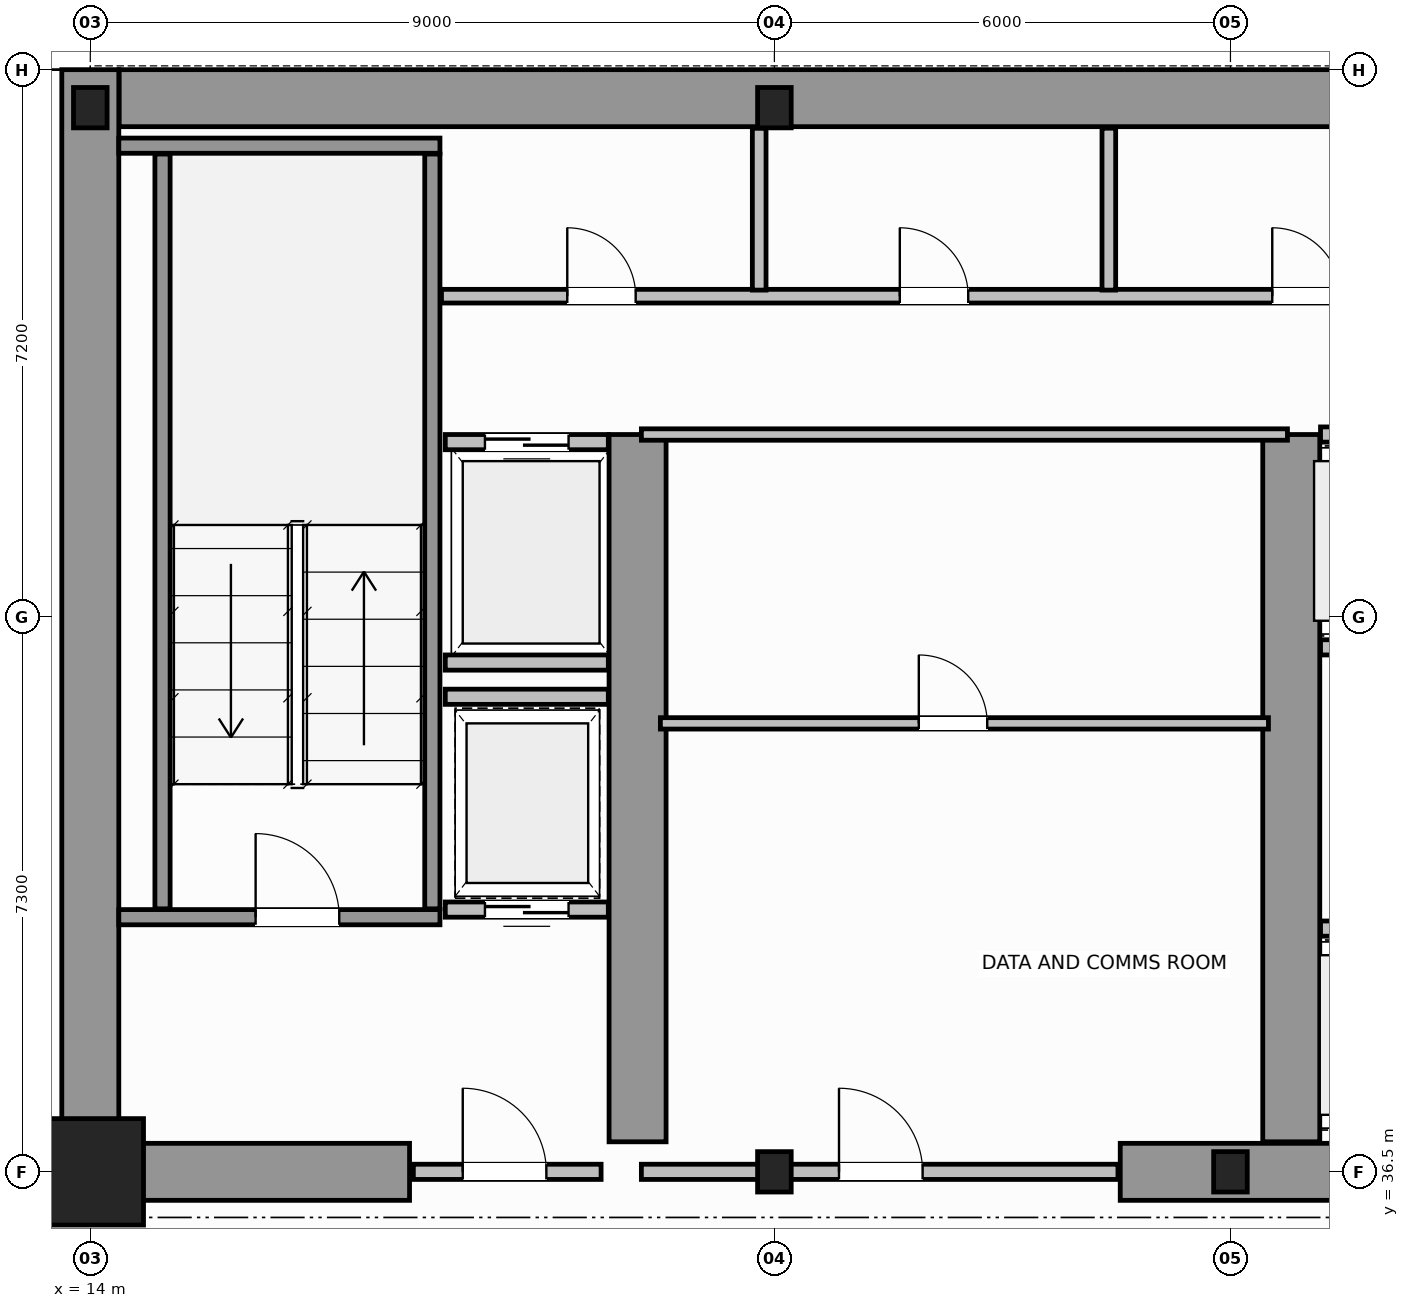
"""IFC4 building model, lengths in metres.
Left out: names, types, materials, properties, quantities, classifications, styles, units other than length and angle.
Written with IfcOpenShell. Run it as: python <this file> out.ifc"""

import sys

from ifc_helpers import new_model, si_unit, direction, frame, frame_2d, origin, origin_2d, place, context, subcontext, project, spatial, rectangle, i_section, extrude, source, transform, mapped, element, fill, save


model = new_model("IFC4")
c1 = context("Model", 3, precision=1e-05, world=origin(), true_north=direction((0.0, 1.0)))
c2 = subcontext(c1, "Body", "Model", "MODEL_VIEW")
j1 = project(units=[si_unit("LENGTHUNIT", "METRE"), si_unit("PLANEANGLEUNIT", "RADIAN")], contexts=[c1])
p1 = place(None, origin())
s1 = spatial("IfcSite", under=j1, at=p1, CompositionType="ELEMENT")
p2 = place(p1, origin())
s2 = spatial("IfcBuilding", under=s1, at=p2, CompositionType="ELEMENT")
p3 = place(p2, frame((0.0, 0.0, 111.0)))
s3 = spatial("IfcBuildingStorey", under=s2, at=p3, CompositionType="ELEMENT", Elevation=111.0)
m1 = source(origin(), c2, "Body", "SweptSolid", [
    extrude(rectangle(XDim=1.4, YDim=1.4, at=origin_2d()), origin(), (0.0, 0.0, 1.0), 3.8),
])
p4 = place(p3, frame((14.0, 36.5, 0.0), z_axis=(0.0, 0.0, 1.0), x_axis=(1.0, 0.0, 0.0)))
e1 = element("IfcColumn", 1, at=p4, inside=s3, PredefinedType="COLUMN", context=c2, shape_type="MappedRepresentation", body=[
    mapped(m1, transform((0.0, 0.0, 0.0), scale=1.0)),
])
m2 = source(origin(), c2, "Body", "SweptSolid", [
    extrude(i_section(OverallWidth=0.442, OverallDepth=0.531, WebThickness=0.065, FlangeThickness=0.076, FilletRadius=0.015, at=origin_2d()), origin(), (0.0, 0.0, 1.0), 3.8),
])
for number, where, z_axis, x_axis in (
    (2, (23.0, 36.5, 0.0), (0.0, 0.0, 1.0), (1.0, 0.0, 0.0)),
    (3, (29.0, 36.5, 0.0), (0.0, 0.0, 1.0), (1.0, 0.0, 0.0)),
    (4, (14.0, 50.5, 0.0), (0.0, 0.0, 1.0), (1.0, 0.0, 0.0)),
    (5, (23.0, 50.5, 0.0), (0.0, 0.0, 1.0), (1.0, 0.0, 0.0)),
):
    element("IfcColumn", number, at=place(p3, frame(where, z_axis=z_axis, x_axis=x_axis)), inside=s3, PredefinedType="COLUMN", context=c2, shape_type="MappedRepresentation", body=[
        mapped(m2, transform((0.0, 0.0, 0.0), scale=1.0)),
    ])
p5 = place(p3, frame((14.379, 50.625, 0.0), z_axis=(0.0, 0.0, 1.0), x_axis=(1.0, 0.0, 0.0)))
e6 = element("IfcWall", 6, at=p5, inside=s3, PredefinedType="SHEAR", context=c2, shape_type="SweptSolid", body=[
    extrude(rectangle(XDim=19.619, YDim=0.75, at=frame_2d((9.81, 0.0))), origin(), (0.0, 0.0, 1.0), 3.8),
])
p6 = place(p3, frame((14.0, 36.5, 0.0), z_axis=(0.0, 0.0, 1.0), x_axis=(0.0, 1.0, 0.0)))
e7 = element("IfcWall", 7, at=p6, inside=s3, PredefinedType="SHEAR", context=c2, shape_type="SweptSolid", body=[
    extrude(rectangle(XDim=14.5, YDim=0.75, at=frame_2d((7.25, 0.0))), origin(), (0.0, 0.0, 1.0), 3.8),
])
p7 = place(p3, frame((14.395, 36.5, 0.0), z_axis=(0.0, 0.0, 1.0), x_axis=(1.0, 0.0, 0.0)))
e8 = element("IfcWall", 8, at=p7, inside=s3, PredefinedType="SHEAR", context=c2, shape_type="SweptSolid", body=[
    extrude(rectangle(XDim=3.805, YDim=0.75, at=frame_2d((1.902, 0.0))), origin(), (0.0, 0.0, 1.0), 2.38),
])
p8 = place(p3, frame((27.55, 36.5, 0.0), z_axis=(0.0, 0.0, 1.0), x_axis=(1.0, 0.0, 0.0)))
e9 = element("IfcWall", 9, at=p8, inside=s3, PredefinedType="SHEAR", context=c2, shape_type="SweptSolid", body=[
    extrude(rectangle(XDim=4.5, YDim=0.75, at=frame_2d((2.25, 0.0))), origin(), (0.0, 0.0, 1.0), 3.8),
])
for number, where, z_axis, x_axis in (
    (10, (21.2, 36.895, 0.0), (0.0, 0.0, 1.0), (0.0, 1.0, 0.0)),
    (11, (29.8, 36.895, 0.0), (0.0, 0.0, 1.0), (0.0, 1.0, 0.0)),
):
    element("IfcWall", number, at=place(p3, frame(where, z_axis=z_axis, x_axis=x_axis)), inside=s3, PredefinedType="SHEAR", context=c2, shape_type="SweptSolid", body=[
        extrude(rectangle(XDim=9.305, YDim=0.75, at=frame_2d((4.652, 0.0))), origin(), (0.0, 0.0, 1.0), 3.8),
    ])
p9 = place(p3, frame((14.375, 39.85, 0.0), z_axis=(0.0, 0.0, 1.0), x_axis=(1.0, 0.0, 0.0)))
e12 = element("IfcWall", 12, at=p9, inside=s3, PredefinedType="SOLIDWALL", context=c2, shape_type="SweptSolid", body=[
    extrude(rectangle(XDim=4.225, YDim=0.2, at=frame_2d((2.113, 0.0))), origin(), (0.0, 0.0, 1.0), 3.8),
])
p10 = place(p9, frame((1.8, 0.0, 0.0)))
e13 = element("IfcOpeningElement", 13, at=p10, cuts=e12, PredefinedType="OPENING", context=c2, shape_type="SweptSolid", body=[
    extrude(rectangle(XDim=1.1, YDim=2.15, at=frame_2d((0.55, 1.075))), frame((0.0, 0.11, 0.0), z_axis=(0.0, -1.0, 0.0), x_axis=(1.0, 0.0, 0.0)), (0.0, 0.0, 1.0), 0.22),
])
p11 = place(p3, frame((14.375, 50.0, 0.0), z_axis=(0.0, 0.0, 1.0), x_axis=(1.0, 0.0, 0.0)))
e14 = element("IfcWall", 14, at=p11, inside=s3, PredefinedType="SOLIDWALL", context=c2, shape_type="SweptSolid", body=[
    extrude(rectangle(XDim=4.225, YDim=0.2, at=frame_2d((2.113, 0.0))), origin(), (0.0, 0.0, 1.0), 3.8),
])
for number, where, z_axis, x_axis in (
    (15, (14.95, 39.96, 0.0), (0.0, 0.0, 1.0), (0.0, 1.0, 0.0)),
    (16, (18.5, 39.96, 0.0), (0.0, 0.0, 1.0), (0.0, 1.0, 0.0)),
):
    element("IfcWall", number, at=place(p3, frame(where, z_axis=z_axis, x_axis=x_axis)), inside=s3, PredefinedType="SOLIDWALL", context=c2, shape_type="SweptSolid", body=[
        extrude(rectangle(XDim=9.93, YDim=0.2, at=frame_2d((4.965, 0.0))), origin(), (0.0, 0.0, 1.0), 3.8),
    ])
p12 = place(p3, frame((18.25, 36.5, 0.0), z_axis=(0.0, 0.0, 1.0), x_axis=(1.0, 0.0, 0.0)))
e17 = element("IfcWall", 17, at=p12, inside=s3, PredefinedType="SOLIDWALL", context=c2, shape_type="SweptSolid", body=[
    extrude(rectangle(XDim=2.47, YDim=0.2, at=frame_2d((1.235, 0.0))), origin(), (0.0, 0.0, 1.0), 2.37),
])
p13 = place(p12, frame((0.65, 0.0, 0.0)))
e18 = element("IfcOpeningElement", 18, at=p13, cuts=e17, PredefinedType="OPENING", context=c2, shape_type="SweptSolid", body=[
    extrude(rectangle(XDim=1.1, YDim=2.15, at=frame_2d((0.55, 1.075))), frame((0.0, 0.11, 0.0), z_axis=(0.0, -1.0, 0.0), x_axis=(1.0, 0.0, 0.0)), (0.0, 0.0, 1.0), 0.22),
])
p14 = place(p3, frame((30.185, 39.7, 0.0), z_axis=(0.0, 0.0, 1.0), x_axis=(1.0, 0.0, 0.0)))
e19 = element("IfcWall", 19, at=p14, inside=s3, PredefinedType="SOLIDWALL", context=c2, shape_type="SweptSolid", body=[
    extrude(rectangle(XDim=1.845, YDim=0.2, at=frame_2d((0.922, 0.0))), origin(), (0.0, 0.0, 1.0), 3.58),
])
p15 = place(p14, frame((0.373, 0.0, 0.0)))
e20 = element("IfcOpeningElement", 20, at=p15, cuts=e19, PredefinedType="OPENING", context=c2, shape_type="SweptSolid", body=[
    extrude(rectangle(XDim=1.1, YDim=2.15, at=frame_2d((0.55, 1.075))), frame((0.0, 0.11, 0.0), z_axis=(0.0, -1.0, 0.0), x_axis=(1.0, 0.0, 0.0)), (0.0, 0.0, 1.0), 0.22),
])
p16 = place(p3, frame((30.185, 43.4, 0.0), z_axis=(0.0, 0.0, 1.0), x_axis=(1.0, 0.0, 0.0)))
e21 = element("IfcWall", 21, at=p16, inside=s3, PredefinedType="SOLIDWALL", context=c2, shape_type="SweptSolid", body=[
    extrude(rectangle(XDim=1.725, YDim=0.2, at=frame_2d((0.862, 0.0))), origin(), (0.0, 0.0, 1.0), 3.58),
])
p17 = place(p16, frame((0.313, 0.0, 0.0)))
e22 = element("IfcOpeningElement", 22, at=p17, cuts=e21, PredefinedType="OPENING", context=c2, shape_type="SweptSolid", body=[
    extrude(rectangle(XDim=1.1, YDim=2.15, at=frame_2d((0.55, 1.075))), frame((0.0, 0.11, 0.0), z_axis=(0.0, -1.0, 0.0), x_axis=(1.0, 0.0, 0.0)), (0.0, 0.0, 1.0), 0.22),
])
p18 = place(p3, frame((30.185, 46.2, 0.0), z_axis=(0.0, 0.0, 1.0), x_axis=(1.0, 0.0, 0.0)))
e23 = element("IfcWall", 23, at=p18, inside=s3, PredefinedType="SOLIDWALL", context=c2, shape_type="SweptSolid", body=[
    extrude(rectangle(XDim=1.725, YDim=0.2, at=frame_2d((0.862, 0.0))), origin(), (0.0, 0.0, 1.0), 3.58),
])
p19 = place(p3, frame((18.67, 46.1, 0.0), z_axis=(0.0, 0.0, 1.0), x_axis=(1.0, 0.0, 0.0)))
e24 = element("IfcWall", 24, at=p19, inside=s3, PredefinedType="SOLIDWALL", context=c2, shape_type="SweptSolid", body=[
    extrude(rectangle(XDim=2.145, YDim=0.2, at=frame_2d((1.073, 0.0))), origin(), (0.0, 0.0, 1.0), 3.58),
])
p20 = place(p19, frame((0.522, 0.0, 0.0)))
e25 = element("IfcOpeningElement", 25, at=p20, cuts=e24, PredefinedType="OPENING", context=c2, shape_type="SweptSolid", body=[
    extrude(rectangle(XDim=1.1, YDim=2.15, at=frame_2d((0.55, 1.075))), frame((0.0, 0.11, 0.0), z_axis=(0.0, -1.0, 0.0), x_axis=(1.0, 0.0, 0.0)), (0.0, 0.0, 1.0), 0.22),
])
p21 = place(p3, frame((18.67, 43.2, 0.0), z_axis=(0.0, 0.0, 1.0), x_axis=(1.0, 0.0, 0.0)))
e26 = element("IfcWall", 26, at=p21, inside=s3, PredefinedType="SOLIDWALL", context=c2, shape_type="SweptSolid", body=[
    extrude(rectangle(XDim=2.145, YDim=0.2, at=frame_2d((1.073, 0.0))), origin(), (0.0, 0.0, 1.0), 3.58),
])
p22 = place(p3, frame((18.67, 39.95, 0.0), z_axis=(0.0, 0.0, 1.0), x_axis=(1.0, 0.0, 0.0)))
e27 = element("IfcWall", 27, at=p22, inside=s3, PredefinedType="SOLIDWALL", context=c2, shape_type="SweptSolid", body=[
    extrude(rectangle(XDim=2.145, YDim=0.2, at=frame_2d((1.073, 0.0))), origin(), (0.0, 0.0, 1.0), 3.58),
])
p23 = place(p22, frame((0.522, 0.0, 0.0)))
e28 = element("IfcOpeningElement", 28, at=p23, cuts=e27, PredefinedType="OPENING", context=c2, shape_type="SweptSolid", body=[
    extrude(rectangle(XDim=1.1, YDim=2.15, at=frame_2d((0.55, 1.075))), frame((0.0, 0.11, 0.0), z_axis=(0.0, -1.0, 0.0), x_axis=(1.0, 0.0, 0.0)), (0.0, 0.0, 1.0), 0.22),
])
p24 = place(p3, frame((18.67, 42.75, 0.0), z_axis=(0.0, 0.0, 1.0), x_axis=(1.0, 0.0, 0.0)))
e29 = element("IfcWall", 29, at=p24, inside=s3, PredefinedType="SOLIDWALL", context=c2, shape_type="SweptSolid", body=[
    extrude(rectangle(XDim=2.145, YDim=0.2, at=frame_2d((1.073, 0.0))), origin(), (0.0, 0.0, 1.0), 3.58),
])
p25 = place(p3, frame((21.25, 36.5, 0.0), z_axis=(0.0, 0.0, 1.0), x_axis=(1.0, 0.0, 0.0)))
e30 = element("IfcWall", 30, at=p25, inside=s3, PredefinedType="SOLIDWALL", context=c2, shape_type="SweptSolid", body=[
    extrude(rectangle(XDim=6.27, YDim=0.2, at=frame_2d((3.135, 0.0))), origin(), (0.0, 0.0, 1.0), 2.37),
])
p26 = place(p25, frame((2.6, 0.0, 0.0)))
e31 = element("IfcOpeningElement", 31, at=p26, cuts=e30, PredefinedType="OPENING", context=c2, shape_type="SweptSolid", body=[
    extrude(rectangle(XDim=1.1, YDim=2.15, at=frame_2d((0.55, 1.075))), frame((0.0, 0.11, 0.0), z_axis=(0.0, -1.0, 0.0), x_axis=(1.0, 0.0, 0.0)), (0.0, 0.0, 1.0), 0.22),
])
p27 = place(p3, frame((21.25, 46.2, 0.0), z_axis=(0.0, 0.0, 1.0), x_axis=(1.0, 0.0, 0.0)))
e32 = element("IfcWall", 32, at=p27, inside=s3, PredefinedType="PARTITIONING", context=c2, shape_type="SweptSolid", body=[
    extrude(rectangle(XDim=8.5, YDim=0.15, at=frame_2d((4.25, 0.0))), origin(), (0.0, 0.0, 1.0), 3.58),
])
p28 = place(p3, frame((21.5, 42.4, 0.0), z_axis=(0.0, 0.0, 1.0), x_axis=(1.0, 0.0, 0.0)))
e33 = element("IfcWall", 33, at=p28, inside=s3, PredefinedType="PARTITIONING", context=c2, shape_type="SweptSolid", body=[
    extrude(rectangle(XDim=8.0, YDim=0.15, at=frame_2d((4.0, 0.0))), origin(), (0.0, 0.0, 1.0), 3.58),
])
p29 = place(p28, frame((3.4, 0.0, 0.0)))
e34 = element("IfcOpeningElement", 34, at=p29, cuts=e33, PredefinedType="OPENING", context=c2, shape_type="SweptSolid", body=[
    extrude(rectangle(XDim=0.9, YDim=2.1, at=frame_2d((0.45, 1.05))), frame((0.0, 0.085, 0.0), z_axis=(0.0, -1.0, 0.0), x_axis=(1.0, 0.0, 0.0)), (0.0, 0.0, 1.0), 0.17),
])
p30 = place(p3, frame((18.62, 48.02, 0.0), z_axis=(0.0, 0.0, 1.0), x_axis=(1.0, 0.0, 0.0)))
e35 = element("IfcWall", 35, at=p30, inside=s3, PredefinedType="PLUMBINGWALL", context=c2, shape_type="SweptSolid", body=[
    extrude(rectangle(XDim=30.76, YDim=0.18, at=frame_2d((15.38, 0.0))), origin(), (0.0, 0.0, 1.0), 3.58),
])
p31 = place(p30, frame((1.655, 0.0, 0.0)))
e36 = element("IfcOpeningElement", 36, at=p31, cuts=e35, PredefinedType="OPENING", context=c2, shape_type="SweptSolid", body=[
    extrude(rectangle(XDim=0.9, YDim=2.15, at=frame_2d((0.45, 1.075))), frame((0.0, 0.1, 0.0), z_axis=(0.0, -1.0, 0.0), x_axis=(1.0, 0.0, 0.0)), (0.0, 0.0, 1.0), 0.2),
])
p32 = place(p30, frame((6.03, 0.0, 0.0)))
e37 = element("IfcOpeningElement", 37, at=p32, cuts=e35, PredefinedType="OPENING", context=c2, shape_type="SweptSolid", body=[
    extrude(rectangle(XDim=0.9, YDim=2.15, at=frame_2d((0.45, 1.075))), frame((0.0, 0.1, 0.0), z_axis=(0.0, -1.0, 0.0), x_axis=(1.0, 0.0, 0.0)), (0.0, 0.0, 1.0), 0.2),
])
p33 = place(p30, frame((10.93, 0.0, 0.0)))
e38 = element("IfcOpeningElement", 38, at=p33, cuts=e35, PredefinedType="OPENING", context=c2, shape_type="SweptSolid", body=[
    extrude(rectangle(XDim=0.9, YDim=2.15, at=frame_2d((0.45, 1.075))), frame((0.0, 0.1, 0.0), z_axis=(0.0, -1.0, 0.0), x_axis=(1.0, 0.0, 0.0)), (0.0, 0.0, 1.0), 0.2),
])
p34 = place(p30, frame((16.13, 0.0, 0.0)))
e39 = element("IfcOpeningElement", 39, at=p34, cuts=e35, PredefinedType="OPENING", context=c2, shape_type="SweptSolid", body=[
    extrude(rectangle(XDim=0.9, YDim=2.15, at=frame_2d((0.45, 1.075))), frame((0.0, 0.1, 0.0), z_axis=(0.0, -1.0, 0.0), x_axis=(1.0, 0.0, 0.0)), (0.0, 0.0, 1.0), 0.2),
])
p35 = place(p30, frame((21.73, 0.0, 0.0)))
e40 = element("IfcOpeningElement", 40, at=p35, cuts=e35, PredefinedType="OPENING", context=c2, shape_type="SweptSolid", body=[
    extrude(rectangle(XDim=0.9, YDim=2.15, at=frame_2d((0.45, 1.075))), frame((0.0, 0.1, 0.0), z_axis=(0.0, -1.0, 0.0), x_axis=(1.0, 0.0, 0.0)), (0.0, 0.0, 1.0), 0.2),
])
p36 = place(p30, frame((27.505, 0.0, 0.0)))
e41 = element("IfcOpeningElement", 41, at=p36, cuts=e35, PredefinedType="OPENING", context=c2, shape_type="SweptSolid", body=[
    extrude(rectangle(XDim=0.9, YDim=2.15, at=frame_2d((0.45, 1.075))), frame((0.0, 0.1, 0.0), z_axis=(0.0, -1.0, 0.0), x_axis=(1.0, 0.0, 0.0)), (0.0, 0.0, 1.0), 0.2),
])
p37 = place(p3, frame((22.8, 48.1, 0.0), z_axis=(0.0, 0.0, 1.0), x_axis=(0.0, 1.0, 0.0)))
e42 = element("IfcWall", 42, at=p37, inside=s3, PredefinedType="PLUMBINGWALL", context=c2, shape_type="SweptSolid", body=[
    extrude(rectangle(XDim=2.13, YDim=0.18, at=frame_2d((1.065, 0.0))), origin(), (0.0, 0.0, 1.0), 2.87),
])
p38 = place(p3, frame((27.4, 48.1, 0.0), z_axis=(0.0, 0.0, 1.0), x_axis=(0.0, 1.0, 0.0)))
e43 = element("IfcWall", 43, at=p38, inside=s3, PredefinedType="PLUMBINGWALL", context=c2, shape_type="SweptSolid", body=[
    extrude(rectangle(XDim=2.13, YDim=0.18, at=frame_2d((1.065, 0.0))), origin(), (0.0, 0.0, 1.0), 3.58),
])
p39 = place(p3, frame((7.271, 36.48, 0.0), z_axis=(0.0, 0.0, 1.0), x_axis=(1.0, 0.0, 0.0)))
e44 = element("IfcWall", 44, at=p39, inside=s3, PredefinedType="PARTITIONING", context=c2, shape_type="SweptSolid", body=[
    extrude(rectangle(XDim=6.668, YDim=0.12, at=frame_2d((3.334, 0.0))), origin(), (0.0, 0.0, 1.0), 2.87),
])
p40 = place(p39, frame((2.884, 0.0, 0.0)))
e45 = element("IfcOpeningElement", 45, at=p40, cuts=e44, PredefinedType="OPENING", context=c2, shape_type="SweptSolid", body=[
    extrude(rectangle(XDim=0.9, YDim=2.15, at=frame_2d((0.45, 1.075))), frame((0.0, 0.07, 0.0), z_axis=(0.0, -1.0, 0.0), x_axis=(1.0, 0.0, 0.0)), (0.0, 0.0, 1.0), 0.14),
])
m3 = source(origin(), c2, "Body", "SweptSolid", [
    extrude(rectangle(XDim=1.1, YDim=2.15, at=frame_2d((0.55, 1.075))), frame((0.0, 0.025, 0.0), z_axis=(0.0, -1.0, 0.0), x_axis=(1.0, 0.0, 0.0)), (0.0, 0.0, 1.0), 0.05),
])
p41 = place(p10, origin())
e46 = element("IfcDoor", 46, at=p41, inside=s3, OperationType="SINGLE_SWING_LEFT", PredefinedType="DOOR", context=c2, shape_type="MappedRepresentation", body=[
    mapped(m3, transform((0.0, 0.0, 0.0), scale=1.0)),
])
fill(e13, e46)
p42 = place(p13, origin())
e47 = element("IfcDoor", 47, at=p42, inside=s3, OperationType="SINGLE_SWING_RIGHT", PredefinedType="DOOR", context=c2, shape_type="MappedRepresentation", body=[
    mapped(m3, transform((0.0, 0.0, 0.0), scale=1.0)),
])
fill(e18, e47)
p43 = place(p20, origin())
e48 = element("IfcDoor", 48, at=p43, inside=s3, OperationType="DOUBLE_DOOR_SLIDING", PredefinedType="DOOR", context=c2, shape_type="MappedRepresentation", body=[
    mapped(m3, transform((0.0, 0.0, 0.0), scale=1.0)),
])
fill(e25, e48)
p44 = place(p23, origin())
e49 = element("IfcDoor", 49, at=p44, inside=s3, OperationType="DOUBLE_DOOR_SLIDING", PredefinedType="DOOR", context=c2, shape_type="MappedRepresentation", body=[
    mapped(m3, transform((0.0, 0.0, 0.0), scale=1.0)),
])
fill(e28, e49)
p45 = place(p26, origin())
e50 = element("IfcDoor", 50, at=p45, inside=s3, OperationType="SINGLE_SWING_LEFT", PredefinedType="DOOR", context=c2, shape_type="MappedRepresentation", body=[
    mapped(m3, transform((0.0, 0.0, 0.0), scale=1.0)),
])
fill(e31, e50)
m4 = source(origin(), c2, "Body", "SweptSolid", [
    extrude(rectangle(XDim=0.9, YDim=2.1, at=frame_2d((0.45, 1.05))), frame((0.0, 0.025, 0.0), z_axis=(0.0, -1.0, 0.0), x_axis=(1.0, 0.0, 0.0)), (0.0, 0.0, 1.0), 0.05),
])
p46 = place(p29, origin())
e51 = element("IfcDoor", 51, at=p46, inside=s3, OperationType="SINGLE_SWING_RIGHT", PredefinedType="DOOR", context=c2, shape_type="MappedRepresentation", body=[
    mapped(m4, transform((0.0, 0.0, 0.0), scale=1.0)),
])
fill(e34, e51)
m5 = source(origin(), c2, "Body", "SweptSolid", [
    extrude(rectangle(XDim=0.9, YDim=2.15, at=frame_2d((0.45, 1.075))), frame((0.0, 0.025, 0.0), z_axis=(0.0, -1.0, 0.0), x_axis=(1.0, 0.0, 0.0)), (0.0, 0.0, 1.0), 0.05),
])
p47 = place(p31, origin())
e52 = element("IfcDoor", 52, at=p47, inside=s3, OperationType="SINGLE_SWING_LEFT", PredefinedType="DOOR", context=c2, shape_type="MappedRepresentation", body=[
    mapped(m5, transform((0.0, 0.0, 0.0), scale=1.0)),
])
fill(e36, e52)
p48 = place(p32, origin())
e53 = element("IfcDoor", 53, at=p48, inside=s3, OperationType="SINGLE_SWING_RIGHT", PredefinedType="DOOR", context=c2, shape_type="MappedRepresentation", body=[
    mapped(m5, transform((0.0, 0.0, 0.0), scale=1.0)),
])
fill(e37, e53)
p49 = place(p33, origin())
e54 = element("IfcDoor", 54, at=p49, inside=s3, OperationType="SINGLE_SWING_LEFT", PredefinedType="DOOR", context=c2, shape_type="MappedRepresentation", body=[
    mapped(m5, transform((0.0, 0.0, 0.0), scale=1.0)),
])
fill(e38, e54)
save(model, sys.argv[1])
